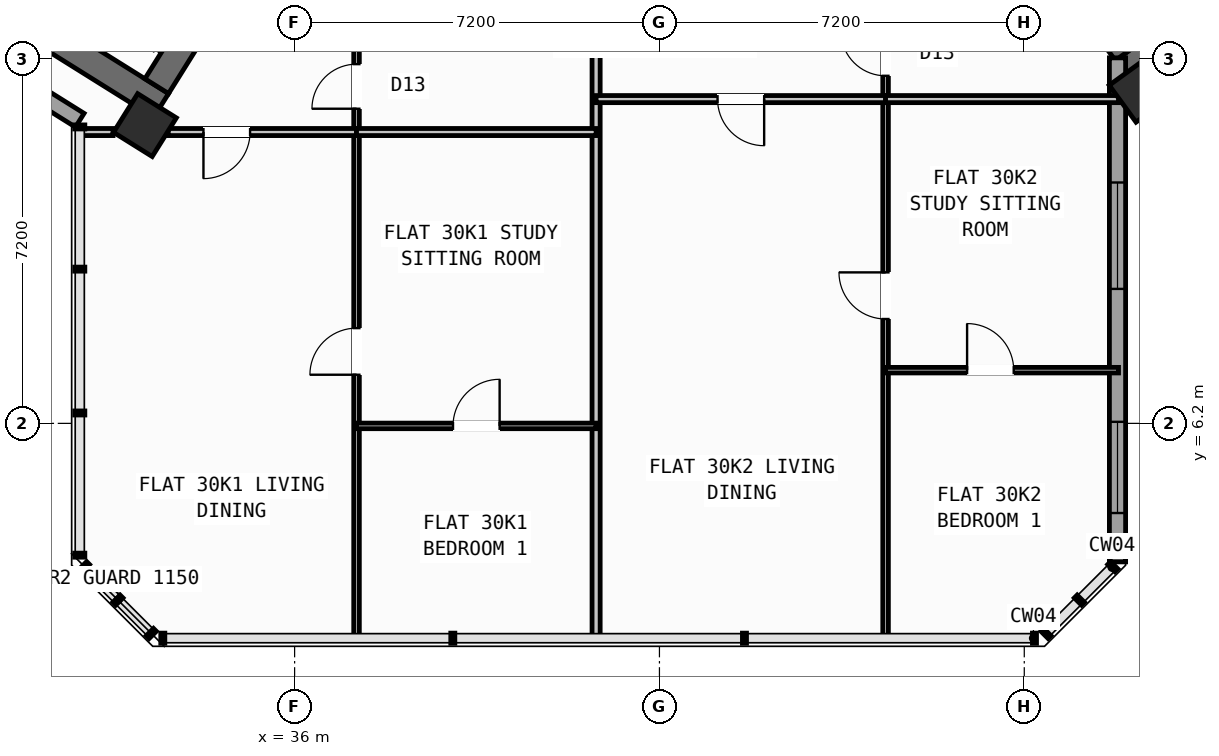
"""IFC4 building model, lengths in metres.
Left out: names, types, materials, properties, quantities, classifications, styles, units other than length and angle.
Written with IfcOpenShell. Run it as: python <this file> out.ifc"""

import sys

from ifc_helpers import new_model, si_unit, direction, frame, frame_2d, origin, origin_2d, place, context, subcontext, project, spatial, rectangle, hollow_rectangle, extrude, source, transform, mapped, element, fill, save


model = new_model("IFC4")
c1 = context("Model", 3, precision=1e-05, world=origin(), true_north=direction((0.0, 1.0)))
c2 = subcontext(c1, "Body", "Model", "MODEL_VIEW")
j1 = project(units=[si_unit("LENGTHUNIT", "METRE"), si_unit("PLANEANGLEUNIT", "RADIAN")], contexts=[c1])
p1 = place(None, origin())
s1 = spatial("IfcSite", under=j1, at=p1, CompositionType="ELEMENT")
p2 = place(p1, origin())
s2 = spatial("IfcBuilding", under=s1, at=p2, CompositionType="ELEMENT")
p3 = place(p2, frame((0.0, 0.0, 119.7)))
s3 = spatial("IfcBuildingStorey", under=s2, at=p3, CompositionType="ELEMENT", Elevation=119.7)
p4 = place(p3, frame((33.366, 12.477, 0.0), z_axis=(0.0, 0.0, 1.0), x_axis=(-0.848047359947, 0.529920442413, 0.0)))
e1 = element("IfcWall", 1, at=p4, inside=s3, PredefinedType="SHEAR", context=c2, shape_type="SweptSolid", body=[
    extrude(rectangle(XDim=13.14, YDim=0.55, at=frame_2d((6.57, 0.0))), origin(), (0.0, 0.0, 1.0), 3.35),
])
p5 = place(p3, frame((36.683, 18.304, 0.0), z_axis=(0.0, 0.0, 1.0), x_axis=(-0.529896466841, -0.848062341122, 0.0)))
e2 = element("IfcWall", 2, at=p5, inside=s3, PredefinedType="SHEAR", context=c2, shape_type="SweptSolid", body=[
    extrude(rectangle(XDim=6.425, YDim=0.55, at=frame_2d((3.212, 0.0))), origin(), (0.0, 0.0, 1.0), 3.35),
])
p6 = place(p3, frame((52.359, 13.14, 0.0), z_axis=(0.0, 0.0, 1.0), x_axis=(0.809014896919, 0.587788139183, 0.0)))
e3 = element("IfcWall", 3, at=p6, inside=s3, PredefinedType="SHEAR", context=c2, shape_type="SweptSolid", body=[
    extrude(rectangle(XDim=12.34, YDim=0.55, at=frame_2d((6.17, 0.0))), origin(), (0.0, 0.0, 1.0), 3.35),
])
p7 = place(p3, frame((52.42, 13.524, 0.0), z_axis=(0.0, 0.0, 1.0), x_axis=(-0.587802113096, 0.809004744015, 0.0)))
e4 = element("IfcWall", 4, at=p7, inside=s3, PredefinedType="SHEAR", context=c2, shape_type="SweptSolid", body=[
    extrude(rectangle(XDim=3.575, YDim=0.55, at=frame_2d((1.788, 0.0))), origin(), (0.0, 0.0, 1.0), 3.35),
])
m1 = source(origin(), c2, "Body", "SweptSolid", [
    extrude(hollow_rectangle(XDim=0.9, YDim=0.9, WallThickness=0.036, at=origin_2d()), origin(), (0.0, 0.0, 1.0), 3.6),
])
for number, where, z_axis, x_axis in (
    (5, (33.046, 12.087, 0.0), (0.0, 0.0, 1.0), (-0.848, 0.53, 0.0)),
    (6, (52.705, 12.773, 0.0), (0.0, 0.0, 1.0), (0.809, 0.588, 0.0)),
):
    element("IfcColumn", number, at=place(p3, frame(where, z_axis=z_axis, x_axis=x_axis)), inside=s3, PredefinedType="COLUMN", context=c2, shape_type="MappedRepresentation", body=[
        mapped(m1, transform((0.0, 0.0, 0.0), scale=1.0)),
    ])
p8 = place(p3, frame((31.76, 12.183, 0.0), z_axis=(0.0, 0.0, 1.0), x_axis=(-0.848047074256, 0.529920899612, 0.0)))
e7 = element("IfcWall", 7, at=p8, inside=s3, PredefinedType="STANDARD", context=c2, shape_type="SweptSolid", body=[
    extrude(rectangle(XDim=30.652, YDim=0.32, at=frame_2d((15.326, 0.0))), origin(), (0.0, 0.0, 1.0), 3.35),
])
p9 = place(p8, frame((15.153, 0.0, 0.0)))
e8 = element("IfcOpeningElement", 8, at=p9, cuts=e7, PredefinedType="OPENING", context=c2, shape_type="SweptSolid", body=[
    extrude(rectangle(XDim=1.2, YDim=2.15, at=frame_2d((0.6, 1.075))), frame((0.0, 0.17, 0.0), z_axis=(0.0, -1.0, 0.0), x_axis=(1.0, 0.0, 0.0)), (0.0, 0.0, 1.0), 0.34),
])
p10 = place(p8, frame((2.002, 0.0, 0.8)))
e9 = element("IfcOpeningElement", 9, at=p10, cuts=e7, PredefinedType="OPENING", context=c2, shape_type="SweptSolid", body=[
    extrude(rectangle(XDim=2.1, YDim=1.55, at=frame_2d((1.05, 0.775))), frame((0.0, 0.17, 0.0), z_axis=(0.0, -1.0, 0.0), x_axis=(1.0, 0.0, 0.0)), (0.0, 0.0, 1.0), 0.34),
])
p11 = place(p8, frame((7.206, 0.0, 0.8)))
e10 = element("IfcOpeningElement", 10, at=p11, cuts=e7, PredefinedType="OPENING", context=c2, shape_type="SweptSolid", body=[
    extrude(rectangle(XDim=2.1, YDim=1.55, at=frame_2d((1.05, 0.775))), frame((0.0, 0.17, 0.0), z_axis=(0.0, -1.0, 0.0), x_axis=(1.0, 0.0, 0.0)), (0.0, 0.0, 1.0), 0.34),
])
p12 = place(p8, frame((12.648, 0.0, 1.0)))
e11 = element("IfcOpeningElement", 11, at=p12, cuts=e7, PredefinedType="OPENING", context=c2, shape_type="SweptSolid", body=[
    extrude(rectangle(XDim=0.9, YDim=1.25, at=frame_2d((0.45, 0.625))), frame((0.0, 0.17, 0.0), z_axis=(0.0, -1.0, 0.0), x_axis=(1.0, 0.0, 0.0)), (0.0, 0.0, 1.0), 0.34),
])
p13 = place(p8, frame((19.458, 0.0, 0.95)))
e12 = element("IfcOpeningElement", 12, at=p13, cuts=e7, PredefinedType="OPENING", context=c2, shape_type="SweptSolid", body=[
    extrude(rectangle(XDim=1.2, YDim=1.4, at=frame_2d((0.6, 0.7))), frame((0.0, 0.17, 0.0), z_axis=(0.0, -1.0, 0.0), x_axis=(1.0, 0.0, 0.0)), (0.0, 0.0, 1.0), 0.34),
])
p14 = place(p8, frame((21.858, 0.0, 0.95)))
e13 = element("IfcOpeningElement", 13, at=p14, cuts=e7, PredefinedType="OPENING", context=c2, shape_type="SweptSolid", body=[
    extrude(rectangle(XDim=1.2, YDim=1.4, at=frame_2d((0.6, 0.7))), frame((0.0, 0.17, 0.0), z_axis=(0.0, -1.0, 0.0), x_axis=(1.0, 0.0, 0.0)), (0.0, 0.0, 1.0), 0.34),
])
p15 = place(p8, frame((27.266, 0.0, 0.8)))
e14 = element("IfcOpeningElement", 14, at=p15, cuts=e7, PredefinedType="OPENING", context=c2, shape_type="SweptSolid", body=[
    extrude(rectangle(XDim=2.1, YDim=1.55, at=frame_2d((1.05, 0.775))), frame((0.0, 0.17, 0.0), z_axis=(0.0, -1.0, 0.0), x_axis=(1.0, 0.0, 0.0)), (0.0, 0.0, 1.0), 0.34),
])
p16 = place(p3, frame((52.24, 13.414, 0.0), z_axis=(0.0, 0.0, 1.0), x_axis=(0.0, -1.0, 0.0)))
e15 = element("IfcWall", 15, at=p16, inside=s3, PredefinedType="STANDARD", context=c2, shape_type="SweptSolid", body=[
    extrude(rectangle(XDim=9.948, YDim=0.32, at=frame_2d((4.974, 0.0))), origin(), (0.0, 0.0, 1.0), 3.35),
])
p17 = place(p16, frame((2.46, 0.0, 0.8)))
e16 = element("IfcOpeningElement", 16, at=p17, cuts=e15, PredefinedType="OPENING", context=c2, shape_type="SweptSolid", body=[
    extrude(rectangle(XDim=2.1, YDim=1.55, at=frame_2d((1.05, 0.775))), frame((0.0, 0.17, 0.0), z_axis=(0.0, -1.0, 0.0), x_axis=(1.0, 0.0, 0.0)), (0.0, 0.0, 1.0), 0.34),
])
p18 = place(p16, frame((7.183, 0.0, 0.85)))
e17 = element("IfcOpeningElement", 17, at=p18, cuts=e15, PredefinedType="OPENING", context=c2, shape_type="SweptSolid", body=[
    extrude(rectangle(XDim=1.8, YDim=1.5, at=frame_2d((0.9, 0.75))), frame((0.0, 0.17, 0.0), z_axis=(0.0, -1.0, 0.0), x_axis=(1.0, 0.0, 0.0)), (0.0, 0.0, 1.0), 0.34),
])
p19 = place(p3, frame((41.95, 1.96, 0.0), z_axis=(0.0, 0.0, 1.0), x_axis=(0.0, 1.0, 0.0)))
e18 = element("IfcWall", 18, at=p19, inside=s3, PredefinedType="PARTITIONING", context=c2, shape_type="SweptSolid", body=[
    extrude(rectangle(XDim=13.46, YDim=0.16, at=frame_2d((6.73, 0.0))), origin(), (0.0, 0.0, 1.0), 3.34),
])
p20 = place(p3, frame((37.222, 1.96, 0.0), z_axis=(0.0, 0.0, 1.0), x_axis=(0.0, 1.0, 0.0)))
e19 = element("IfcWall", 19, at=p20, inside=s3, PredefinedType="PARTITIONING", context=c2, shape_type="SweptSolid", body=[
    extrude(rectangle(XDim=13.46, YDim=0.11, at=frame_2d((6.73, 0.0))), origin(), (0.0, 0.0, 1.0), 3.34),
])
p21 = place(p20, frame((5.2, 0.0, 0.0)))
e20 = element("IfcOpeningElement", 20, at=p21, cuts=e19, PredefinedType="OPENING", context=c2, shape_type="SweptSolid", body=[
    extrude(rectangle(XDim=0.92, YDim=2.08, at=frame_2d((0.46, 1.04))), frame((0.0, 0.065, 0.0), z_axis=(0.0, -1.0, 0.0), x_axis=(1.0, 0.0, 0.0)), (0.0, 0.0, 1.0), 0.13),
])
p22 = place(p20, frame((10.45, 0.0, 0.0)))
e21 = element("IfcOpeningElement", 21, at=p22, cuts=e19, PredefinedType="OPENING", context=c2, shape_type="SweptSolid", body=[
    extrude(rectangle(XDim=0.88, YDim=2.08, at=frame_2d((0.44, 1.04))), frame((0.0, 0.065, 0.0), z_axis=(0.0, -1.0, 0.0), x_axis=(1.0, 0.0, 0.0)), (0.0, 0.0, 1.0), 0.13),
])
p23 = place(p3, frame((31.74, 11.95, 0.0), z_axis=(0.0, 0.0, 1.0), x_axis=(1.0, 0.0, 0.0)))
e22 = element("IfcWall", 22, at=p23, inside=s3, PredefinedType="PLUMBINGWALL", context=c2, shape_type="SweptSolid", body=[
    extrude(rectangle(XDim=0.676, YDim=0.14, at=frame_2d((0.338, 0.0))), origin(), (0.0, 0.0, 1.0), 3.34),
])
p24 = place(p3, frame((33.505, 11.95, 0.0), z_axis=(0.0, 0.0, 1.0), x_axis=(1.0, 0.0, 0.0)))
e23 = element("IfcWall", 23, at=p24, inside=s3, PredefinedType="PLUMBINGWALL", context=c2, shape_type="SweptSolid", body=[
    extrude(rectangle(XDim=3.717, YDim=0.14, at=frame_2d((1.858, 0.0))), origin(), (0.0, 0.0, 1.0), 2.525),
])
p25 = place(p24, frame((0.696, 0.0, 0.0)))
e24 = element("IfcOpeningElement", 24, at=p25, cuts=e23, PredefinedType="OPENING", context=c2, shape_type="SweptSolid", body=[
    extrude(rectangle(XDim=0.92, YDim=2.08, at=frame_2d((0.46, 1.04))), frame((0.0, 0.08, 0.0), z_axis=(0.0, -1.0, 0.0), x_axis=(1.0, 0.0, 0.0)), (0.0, 0.0, 1.0), 0.16),
])
p26 = place(p3, frame((37.222, 11.95, 0.0), z_axis=(0.0, 0.0, 1.0), x_axis=(1.0, 0.0, 0.0)))
e25 = element("IfcWall", 25, at=p26, inside=s3, PredefinedType="PLUMBINGWALL", context=c2, shape_type="SweptSolid", body=[
    extrude(rectangle(XDim=4.728, YDim=0.14, at=frame_2d((2.364, 0.0))), origin(), (0.0, 0.0, 1.0), 2.525),
])
p27 = place(p3, frame((37.222, 6.15, 0.0), z_axis=(0.0, 0.0, 1.0), x_axis=(1.0, 0.0, 0.0)))
e26 = element("IfcWall", 26, at=p27, inside=s3, PredefinedType="PARTITIONING", context=c2, shape_type="SweptSolid", body=[
    extrude(rectangle(XDim=4.728, YDim=0.11, at=frame_2d((2.364, 0.0))), origin(), (0.0, 0.0, 1.0), 3.34),
])
p28 = place(p27, frame((1.904, 0.0, 0.0)))
e27 = element("IfcOpeningElement", 27, at=p28, cuts=e26, PredefinedType="OPENING", context=c2, shape_type="SweptSolid", body=[
    extrude(rectangle(XDim=0.92, YDim=2.08, at=frame_2d((0.46, 1.04))), frame((0.0, 0.065, 0.0), z_axis=(0.0, -1.0, 0.0), x_axis=(1.0, 0.0, 0.0)), (0.0, 0.0, 1.0), 0.13),
])
p29 = place(p3, frame((47.663, 1.96, 0.0), z_axis=(0.0, 0.0, 1.0), x_axis=(0.0, 1.0, 0.0)))
e28 = element("IfcWall", 28, at=p29, inside=s3, PredefinedType="PARTITIONING", context=c2, shape_type="SweptSolid", body=[
    extrude(rectangle(XDim=13.46, YDim=0.11, at=frame_2d((6.73, 0.0))), origin(), (0.0, 0.0, 1.0), 3.34),
])
p30 = place(p29, frame((6.3, 0.0, 0.0)))
e29 = element("IfcOpeningElement", 29, at=p30, cuts=e28, PredefinedType="OPENING", context=c2, shape_type="SweptSolid", body=[
    extrude(rectangle(XDim=0.92, YDim=2.08, at=frame_2d((0.46, 1.04))), frame((0.0, 0.065, 0.0), z_axis=(0.0, -1.0, 0.0), x_axis=(1.0, 0.0, 0.0)), (0.0, 0.0, 1.0), 0.13),
])
p31 = place(p29, frame((11.1, 0.0, 0.0)))
e30 = element("IfcOpeningElement", 30, at=p31, cuts=e28, PredefinedType="OPENING", context=c2, shape_type="SweptSolid", body=[
    extrude(rectangle(XDim=0.88, YDim=2.08, at=frame_2d((0.44, 1.04))), frame((0.0, 0.065, 0.0), z_axis=(0.0, -1.0, 0.0), x_axis=(1.0, 0.0, 0.0)), (0.0, 0.0, 1.0), 0.13),
])
p32 = place(p3, frame((41.95, 12.6, 0.0), z_axis=(0.0, 0.0, 1.0), x_axis=(1.0, 0.0, 0.0)))
e31 = element("IfcWall", 31, at=p32, inside=s3, PredefinedType="PLUMBINGWALL", context=c2, shape_type="SweptSolid", body=[
    extrude(rectangle(XDim=5.713, YDim=0.14, at=frame_2d((2.856, 0.0))), origin(), (0.0, 0.0, 1.0), 2.525),
])
p33 = place(p32, frame((2.396, 0.0, 0.0)))
e32 = element("IfcOpeningElement", 32, at=p33, cuts=e31, PredefinedType="OPENING", context=c2, shape_type="SweptSolid", body=[
    extrude(rectangle(XDim=0.92, YDim=2.08, at=frame_2d((0.46, 1.04))), frame((0.0, 0.08, 0.0), z_axis=(0.0, -1.0, 0.0), x_axis=(1.0, 0.0, 0.0)), (0.0, 0.0, 1.0), 0.16),
])
p34 = place(p3, frame((47.663, 12.6, 0.0), z_axis=(0.0, 0.0, 1.0), x_axis=(1.0, 0.0, 0.0)))
e33 = element("IfcWall", 33, at=p34, inside=s3, PredefinedType="PLUMBINGWALL", context=c2, shape_type="SweptSolid", body=[
    extrude(rectangle(XDim=4.597, YDim=0.14, at=frame_2d((2.298, 0.0))), origin(), (0.0, 0.0, 1.0), 2.525),
])
p35 = place(p3, frame((47.663, 7.25, 0.0), z_axis=(0.0, 0.0, 1.0), x_axis=(1.0, 0.0, 0.0)))
e34 = element("IfcWall", 34, at=p35, inside=s3, PredefinedType="PARTITIONING", context=c2, shape_type="SweptSolid", body=[
    extrude(rectangle(XDim=4.597, YDim=0.11, at=frame_2d((2.298, 0.0))), origin(), (0.0, 0.0, 1.0), 3.34),
])
p36 = place(p35, frame((1.608, 0.0, 0.0)))
e35 = element("IfcOpeningElement", 35, at=p36, cuts=e34, PredefinedType="OPENING", context=c2, shape_type="SweptSolid", body=[
    extrude(rectangle(XDim=0.92, YDim=2.08, at=frame_2d((0.46, 1.04))), frame((0.0, 0.065, 0.0), z_axis=(0.0, -1.0, 0.0), x_axis=(1.0, 0.0, 0.0)), (0.0, 0.0, 1.0), 0.13),
])
m2 = source(origin(), c2, "Body", "SweptSolid", [
    extrude(rectangle(XDim=2.1, YDim=1.55, at=frame_2d((1.05, 0.775))), frame((0.0, 0.03, 0.0), z_axis=(0.0, -1.0, 0.0), x_axis=(1.0, 0.0, 0.0)), (0.0, 0.0, 1.0), 0.06),
])
p37 = place(p17, origin())
e36 = element("IfcWindow", 36, at=p37, inside=s3, PartitioningType="SINGLE_PANEL", PredefinedType="WINDOW", context=c2, shape_type="MappedRepresentation", body=[
    mapped(m2, transform((0.0, 0.0, 0.0), scale=1.0)),
])
fill(e16, e36)
m3 = source(origin(), c2, "Body", "SweptSolid", [
    extrude(rectangle(XDim=1.8, YDim=1.5, at=frame_2d((0.9, 0.75))), frame((0.0, 0.03, 0.0), z_axis=(0.0, -1.0, 0.0), x_axis=(1.0, 0.0, 0.0)), (0.0, 0.0, 1.0), 0.06),
])
p38 = place(p18, origin())
e37 = element("IfcWindow", 37, at=p38, inside=s3, PartitioningType="SINGLE_PANEL", PredefinedType="WINDOW", context=c2, shape_type="MappedRepresentation", body=[
    mapped(m3, transform((0.0, 0.0, 0.0), scale=1.0)),
])
fill(e17, e37)
m4 = source(origin(), c2, "Body", "SweptSolid", [
    extrude(rectangle(XDim=0.92, YDim=2.08, at=frame_2d((0.46, 1.04))), frame((0.0, 0.025, 0.0), z_axis=(0.0, -1.0, 0.0), x_axis=(1.0, 0.0, 0.0)), (0.0, 0.0, 1.0), 0.05),
])
p39 = place(p21, origin())
e38 = element("IfcDoor", 38, at=p39, inside=s3, OperationType="SINGLE_SWING_LEFT", PredefinedType="DOOR", context=c2, shape_type="MappedRepresentation", body=[
    mapped(m4, transform((0.0, 0.0, 0.0), scale=1.0)),
])
fill(e20, e38)
p40 = place(p28, origin())
e39 = element("IfcDoor", 39, at=p40, inside=s3, OperationType="SINGLE_SWING_RIGHT", PredefinedType="DOOR", context=c2, shape_type="MappedRepresentation", body=[
    mapped(m4, transform((0.0, 0.0, 0.0), scale=1.0)),
])
fill(e27, e39)
p41 = place(p25, frame((0.92, 0.0, 0.0), z_axis=(0.0, 0.0, 1.0), x_axis=(-1.0, 0.0, 0.0)))
e40 = element("IfcDoor", 40, at=p41, inside=s3, OperationType="SINGLE_SWING_RIGHT", PredefinedType="DOOR", context=c2, shape_type="MappedRepresentation", body=[
    mapped(m4, transform((0.0, 0.0, 0.0), scale=1.0)),
])
fill(e24, e40)
m5 = source(origin(), c2, "Body", "SweptSolid", [
    extrude(rectangle(XDim=0.88, YDim=2.08, at=frame_2d((0.44, 1.04))), frame((0.0, 0.025, 0.0), z_axis=(0.0, -1.0, 0.0), x_axis=(1.0, 0.0, 0.0)), (0.0, 0.0, 1.0), 0.05),
])
p42 = place(p22, origin())
e41 = element("IfcDoor", 41, at=p42, inside=s3, OperationType="SINGLE_SWING_LEFT", PredefinedType="DOOR", context=c2, shape_type="MappedRepresentation", body=[
    mapped(m5, transform((0.0, 0.0, 0.0), scale=1.0)),
])
fill(e21, e41)
p43 = place(p30, origin())
e42 = element("IfcDoor", 42, at=p43, inside=s3, OperationType="SINGLE_SWING_RIGHT", PredefinedType="DOOR", context=c2, shape_type="MappedRepresentation", body=[
    mapped(m4, transform((0.0, 0.0, 0.0), scale=1.0)),
])
fill(e29, e42)
p44 = place(p36, origin())
e43 = element("IfcDoor", 43, at=p44, inside=s3, OperationType="SINGLE_SWING_LEFT", PredefinedType="DOOR", context=c2, shape_type="MappedRepresentation", body=[
    mapped(m4, transform((0.0, 0.0, 0.0), scale=1.0)),
])
fill(e35, e43)
p45 = place(p33, frame((0.92, 0.0, 0.0), z_axis=(0.0, 0.0, 1.0), x_axis=(-1.0, 0.0, 0.0)))
e44 = element("IfcDoor", 44, at=p45, inside=s3, OperationType="SINGLE_SWING_LEFT", PredefinedType="DOOR", context=c2, shape_type="MappedRepresentation", body=[
    mapped(m4, transform((0.0, 0.0, 0.0), scale=1.0)),
])
fill(e32, e44)
p46 = place(p31, origin())
e45 = element("IfcDoor", 45, at=p46, inside=s3, OperationType="SINGLE_SWING_RIGHT", PredefinedType="DOOR", context=c2, shape_type="MappedRepresentation", body=[
    mapped(m5, transform((0.0, 0.0, 0.0), scale=1.0)),
])
fill(e30, e45)
save(model, sys.argv[1])
